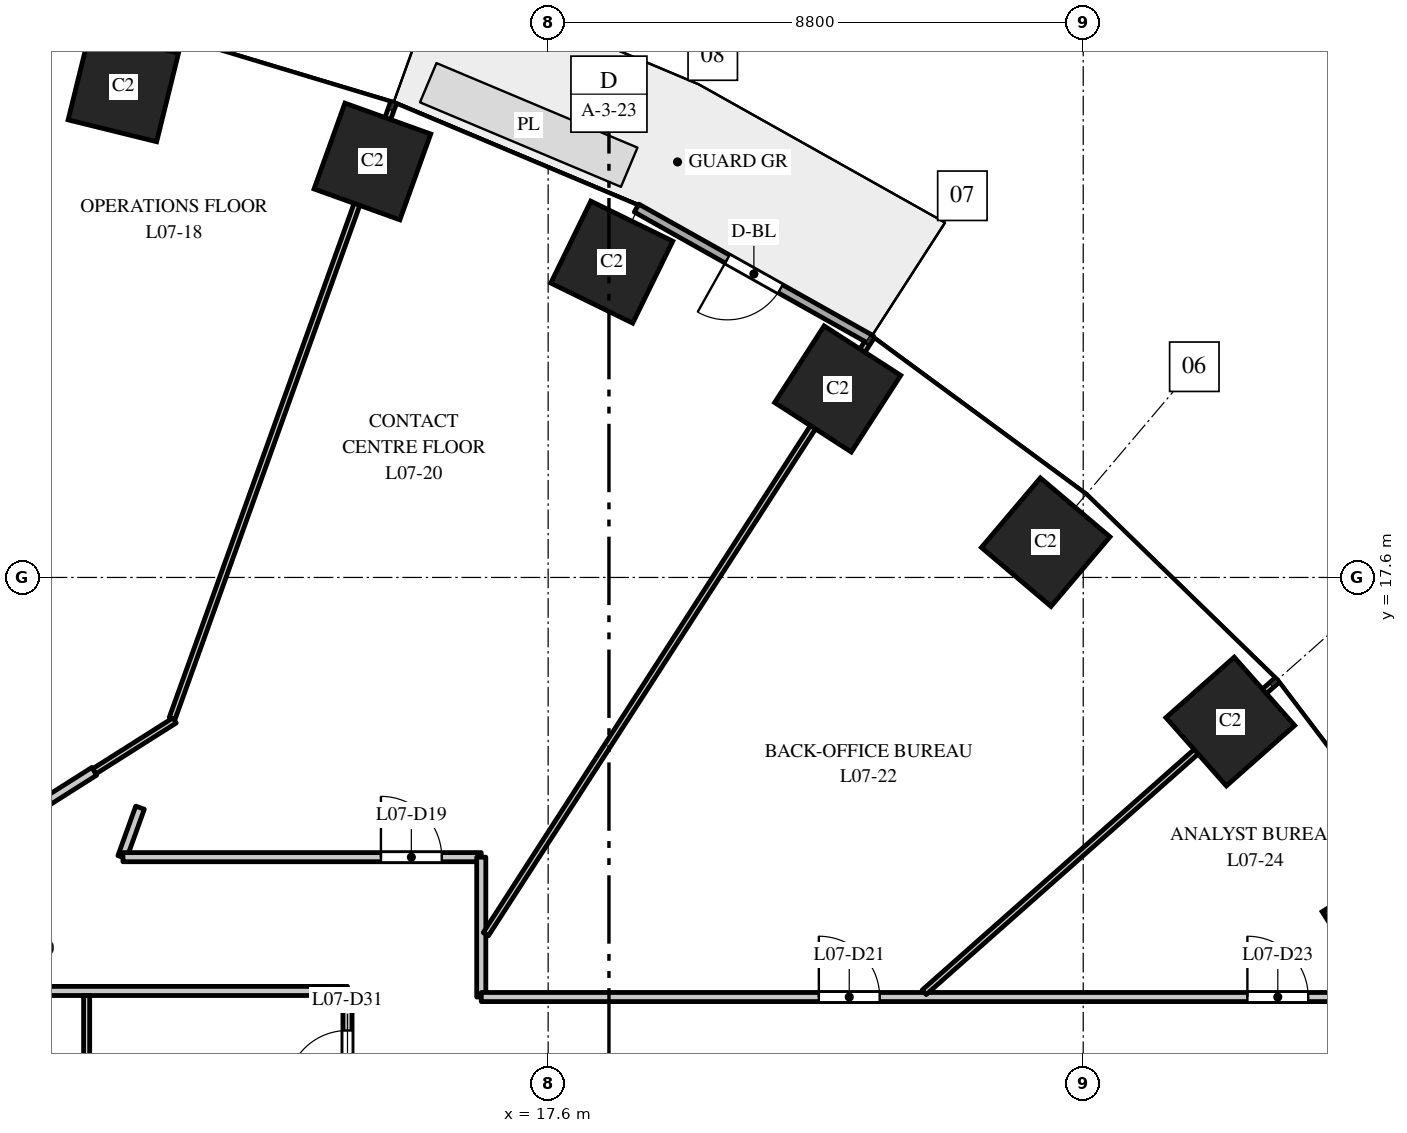
"""IFC4 building model, lengths in metres.
Left out: names, types, materials, properties, quantities, classifications, styles, units other than length and angle.
Written with IfcOpenShell. Run it as: python <this file> out.ifc"""

import sys

from ifc_helpers import new_model, si_unit, direction, frame, frame_2d, origin, origin_2d, place, context, subcontext, project, spatial, rectangle, extrude, element, fill, save


model = new_model("IFC4")
c1 = context("Model", 3, precision=1e-05, world=origin(), true_north=direction((0.0, 1.0)))
c2 = subcontext(c1, "Body", "Model", "MODEL_VIEW")
j1 = project(units=[si_unit("LENGTHUNIT", "METRE"), si_unit("PLANEANGLEUNIT", "RADIAN")], contexts=[c1])
p1 = place(None, origin())
s1 = spatial("IfcSite", under=j1, at=p1, CompositionType="ELEMENT")
p2 = place(p1, origin())
s2 = spatial("IfcBuilding", under=s1, at=p2, CompositionType="ELEMENT")
p3 = place(p2, frame((0.0, 0.0, 38.5)))
s3 = spatial("IfcBuildingStorey", under=s2, at=p3, CompositionType="ELEMENT", Elevation=38.5)
for number, where, z_axis, x_axis in (
    (1, (31.365, 11.871, 0.0), (0.0, 0.0, 1.0), (-0.535, 0.845, 0.0)),
    (2, (28.819, 15.23, 0.0), (0.0, 0.0, 1.0), (-0.663, 0.749, 0.0)),
    (3, (25.783, 18.18, 0.0), (0.0, 0.0, 1.0), (-0.763, 0.646, 0.0)),
    (4, (22.362, 20.7, 0.0), (0.0, 0.0, 1.0), (-0.84, 0.542, 0.0)),
    (5, (18.646, 22.785, 0.0), (0.0, 0.0, 1.0), (-0.898, 0.439, 0.0)),
    (6, (14.709, 24.441, 0.0), (0.0, 0.0, 1.0), (-0.941, 0.338, 0.0)),
    (7, (10.613, 25.674, 0.0), (0.0, 0.0, 1.0), (-0.971, 0.24, 0.0)),
):
    element("IfcColumn", number, at=place(p3, frame(where, z_axis=z_axis, x_axis=x_axis)), inside=s3, PredefinedType="COLUMN", context=c2, shape_type="SweptSolid", body=[
        extrude(rectangle(XDim=1.5, YDim=1.5, at=origin_2d()), origin(), (0.0, 0.0, 1.0), 4.0),
    ])
p4 = place(p3, frame((22.913, 21.509, 0.0), z_axis=(0.0, 0.0, 1.0), x_axis=(-0.872046572975, 0.489422899509, 0.0)))
e8 = element("IfcWall", 8, at=p4, inside=s3, PredefinedType="STANDARD", context=c2, shape_type="SweptSolid", body=[
    extrude(rectangle(XDim=4.426, YDim=0.15, at=frame_2d((2.213, 0.0))), origin(), (0.0, 0.0, 1.0), 3.7),
])
p5 = place(p4, frame((1.713, 0.0, 0.0)))
e9 = element("IfcOpeningElement", 9, at=p5, cuts=e8, PredefinedType="OPENING", context=c2, shape_type="SweptSolid", body=[
    extrude(rectangle(XDim=1.0, YDim=2.4, at=frame_2d((0.5, 1.2))), frame((0.0, 0.085, 0.0), z_axis=(0.0, -1.0, 0.0), x_axis=(1.0, 0.0, 0.0)), (0.0, 0.0, 1.0), 0.17),
])
p6 = place(p3, frame((-14.3, 10.8, 0.0), z_axis=(0.0, 0.0, 1.0), x_axis=(1.0, 0.0, 0.0)))
e10 = element("IfcWall", 10, at=p6, inside=s3, PredefinedType="PARTITIONING", context=c2, shape_type="SweptSolid", body=[
    extrude(rectangle(XDim=28.6, YDim=0.15, at=frame_2d((14.3, 0.0))), origin(), (0.0, 0.0, 1.0), 2.85),
])
p7 = place(p6, frame((10.66, 0.0, 0.0)))
e11 = element("IfcOpeningElement", 11, at=p7, cuts=e10, PredefinedType="OPENING", context=c2, shape_type="SweptSolid", body=[
    extrude(rectangle(XDim=1.0, YDim=2.1, at=frame_2d((0.5, 1.05))), frame((0.0, 0.085, 0.0), z_axis=(0.0, -1.0, 0.0), x_axis=(1.0, 0.0, 0.0)), (0.0, 0.0, 1.0), 0.17),
])
p8 = place(p6, frame((15.427, 0.0, 0.0)))
e12 = element("IfcOpeningElement", 12, at=p8, cuts=e10, PredefinedType="OPENING", context=c2, shape_type="SweptSolid", body=[
    extrude(rectangle(XDim=1.0, YDim=2.1, at=frame_2d((0.5, 1.05))), frame((0.0, 0.085, 0.0), z_axis=(0.0, -1.0, 0.0), x_axis=(1.0, 0.0, 0.0)), (0.0, 0.0, 1.0), 0.17),
])
p9 = place(p6, frame((22.693, 0.0, 0.0)))
e13 = element("IfcOpeningElement", 13, at=p9, cuts=e10, PredefinedType="OPENING", context=c2, shape_type="SweptSolid", body=[
    extrude(rectangle(XDim=1.0, YDim=2.1, at=frame_2d((0.5, 1.05))), frame((0.0, 0.085, 0.0), z_axis=(0.0, -1.0, 0.0), x_axis=(1.0, 0.0, 0.0)), (0.0, 0.0, 1.0), 0.17),
])
p10 = place(p3, frame((8.028, 13.077, 0.0), z_axis=(0.0, 0.0, 1.0), x_axis=(0.844718865656, 0.53521027457, 0.0)))
e14 = element("IfcWall", 14, at=p10, inside=s3, PredefinedType="PARTITIONING", context=c2, shape_type="SweptSolid", body=[
    extrude(rectangle(XDim=2.497, YDim=0.15, at=frame_2d((1.248, 0.0))), origin(), (0.0, 0.0, 1.0), 3.7),
])
p11 = place(p3, frame((10.01, -10.725, 0.0), z_axis=(0.0, 0.0, 1.0), x_axis=(0.0, 1.0, 0.0)))
e15 = element("IfcWall", 15, at=p11, inside=s3, PredefinedType="PARTITIONING", context=c2, shape_type="SweptSolid", body=[
    extrude(rectangle(XDim=21.45, YDim=0.1, at=frame_2d((10.725, 0.0))), origin(), (0.0, 0.0, 1.0), 2.75),
])
p12 = place(p3, frame((10.137, 14.413, 0.0), z_axis=(0.0, 0.0, 1.0), x_axis=(0.844849680057, 0.535003755228, 0.0)))
e16 = element("IfcWall", 16, at=p12, inside=s3, PredefinedType="PARTITIONING", context=c2, shape_type="SweptSolid", body=[
    extrude(rectangle(XDim=1.562, YDim=0.1, at=frame_2d((0.781, 0.0))), origin(), (0.0, 0.0, 1.0), 3.7),
])
p13 = place(p3, frame((10.595, 13.0, 0.0), z_axis=(0.0, 0.0, 1.0), x_axis=(0.338659506624, 0.940908995904, 0.0)))
e17 = element("IfcWall", 17, at=p13, inside=s3, PredefinedType="PARTITIONING", context=c2, shape_type="SweptSolid", body=[
    extrude(rectangle(XDim=0.865, YDim=0.15, at=frame_2d((0.433, 0.0))), origin(), (0.0, 0.0, 1.0), 3.7),
])
p14 = place(p3, frame((10.607, 13.0, 0.0), z_axis=(0.0, 0.0, 1.0), x_axis=(1.0, 0.0, 0.0)))
e18 = element("IfcWall", 18, at=p14, inside=s3, PredefinedType="PARTITIONING", context=c2, shape_type="SweptSolid", body=[
    extrude(rectangle(XDim=5.893, YDim=0.15, at=frame_2d((2.947, 0.0))), origin(), (0.0, 0.0, 1.0), 3.7),
])
p15 = place(p14, frame((4.243, 0.0, 0.0)))
e19 = element("IfcOpeningElement", 19, at=p15, cuts=e18, PredefinedType="OPENING", context=c2, shape_type="SweptSolid", body=[
    extrude(rectangle(XDim=1.0, YDim=2.1, at=frame_2d((0.5, 1.05))), frame((0.0, 0.085, 0.0), z_axis=(0.0, -1.0, 0.0), x_axis=(1.0, 0.0, 0.0)), (0.0, 0.0, 1.0), 0.17),
])
p16 = place(p3, frame((11.416, 15.282, 0.0), z_axis=(0.0, 0.0, 1.0), x_axis=(0.338364268616, 0.94101520802, 0.0)))
e20 = element("IfcWall", 20, at=p16, inside=s3, PredefinedType="PARTITIONING", context=c2, shape_type="SweptSolid", body=[
    extrude(rectangle(XDim=10.734, YDim=0.1, at=frame_2d((5.367, 0.0))), origin(), (0.0, 0.0, 1.0), 3.7),
])
p17 = place(p3, frame((14.3, -10.8, 0.0), z_axis=(0.0, 0.0, 1.0), x_axis=(0.0, 1.0, 0.0)))
e21 = element("IfcWall", 21, at=p17, inside=s3, PredefinedType="PARTITIONING", context=c2, shape_type="SweptSolid", body=[
    extrude(rectangle(XDim=21.6, YDim=0.15, at=frame_2d((10.8, 0.0))), origin(), (0.0, 0.0, 1.0), 2.75),
])
p18 = place(p17, frame((19.95, 0.0, 0.0)))
e22 = element("IfcOpeningElement", 22, at=p18, cuts=e21, PredefinedType="OPENING", context=c2, shape_type="SweptSolid", body=[
    extrude(rectangle(XDim=1.0, YDim=2.1, at=frame_2d((0.5, 1.05))), frame((0.0, 0.085, 0.0), z_axis=(0.0, -1.0, 0.0), x_axis=(1.0, 0.0, 0.0)), (0.0, 0.0, 1.0), 0.17),
])
p19 = place(p3, frame((16.5, 10.7, 0.0), z_axis=(0.0, 0.0, 1.0), x_axis=(0.0, 1.0, 0.0)))
e23 = element("IfcWall", 23, at=p19, inside=s3, PredefinedType="PARTITIONING", context=c2, shape_type="SweptSolid", body=[
    extrude(rectangle(XDim=2.3, YDim=0.15, at=frame_2d((1.15, 0.0))), origin(), (0.0, 0.0, 1.0), 3.7),
])
p20 = place(p3, frame((16.5, 10.7, 0.0), z_axis=(0.0, 0.0, 1.0), x_axis=(1.0, 0.0, 0.0)))
e24 = element("IfcWall", 24, at=p20, inside=s3, PredefinedType="PARTITIONING", context=c2, shape_type="SweptSolid", body=[
    extrude(rectangle(XDim=15.0, YDim=0.15, at=frame_2d((7.5, 0.0))), origin(), (0.0, 0.0, 1.0), 2.75),
])
p21 = place(p20, frame((5.552, 0.0, 0.0)))
e25 = element("IfcOpeningElement", 25, at=p21, cuts=e24, PredefinedType="OPENING", context=c2, shape_type="SweptSolid", body=[
    extrude(rectangle(XDim=1.0, YDim=2.1, at=frame_2d((0.5, 1.05))), frame((0.0, 0.085, 0.0), z_axis=(0.0, -1.0, 0.0), x_axis=(1.0, 0.0, 0.0)), (0.0, 0.0, 1.0), 0.17),
])
p22 = place(p20, frame((12.6, 0.0, 0.0)))
e26 = element("IfcOpeningElement", 26, at=p22, cuts=e24, PredefinedType="OPENING", context=c2, shape_type="SweptSolid", body=[
    extrude(rectangle(XDim=1.0, YDim=2.1, at=frame_2d((0.5, 1.05))), frame((0.0, 0.085, 0.0), z_axis=(0.0, -1.0, 0.0), x_axis=(1.0, 0.0, 0.0)), (0.0, 0.0, 1.0), 0.17),
])
p23 = place(p3, frame((16.575, 11.733, 0.0), z_axis=(0.0, 0.0, 1.0), x_axis=(0.54222594427, 0.840232720953, 0.0)))
e27 = element("IfcWall", 27, at=p23, inside=s3, PredefinedType="PARTITIONING", context=c2, shape_type="SweptSolid", body=[
    extrude(rectangle(XDim=11.674, YDim=0.1, at=frame_2d((5.837, 0.0))), origin(), (0.0, 0.0, 1.0), 3.7),
])
p24 = place(p3, frame((23.785, 10.778, 0.0), z_axis=(0.0, 0.0, 1.0), x_axis=(0.748985701008, 0.662586160198, 0.0)))
e28 = element("IfcWall", 28, at=p24, inside=s3, PredefinedType="PARTITIONING", context=c2, shape_type="SweptSolid", body=[
    extrude(rectangle(XDim=7.723, YDim=0.1, at=frame_2d((3.861, 0.0))), origin(), (0.0, 0.0, 1.0), 3.7),
])
p25 = place(p5, origin())
e29 = element("IfcDoor", 29, at=p25, inside=s3, OperationType="SINGLE_SWING_RIGHT", PredefinedType="DOOR", context=c2, shape_type="SweptSolid", body=[
    extrude(rectangle(XDim=1.0, YDim=2.4, at=frame_2d((0.5, 1.2))), frame((0.0, 0.025, 0.0), z_axis=(0.0, -1.0, 0.0), x_axis=(1.0, 0.0, 0.0)), (0.0, 0.0, 1.0), 0.05),
])
fill(e9, e29)
p26 = place(p15, origin())
e30 = element("IfcDoor", 30, at=p26, inside=s3, OperationType="SINGLE_SWING_LEFT", PredefinedType="DOOR", context=c2, shape_type="SweptSolid", body=[
    extrude(rectangle(XDim=1.0, YDim=2.1, at=frame_2d((0.5, 1.05))), frame((0.0, 0.025, 0.0), z_axis=(0.0, -1.0, 0.0), x_axis=(1.0, 0.0, 0.0)), (0.0, 0.0, 1.0), 0.05),
])
fill(e19, e30)
p27 = place(p21, origin())
e31 = element("IfcDoor", 31, at=p27, inside=s3, OperationType="SINGLE_SWING_LEFT", PredefinedType="DOOR", context=c2, shape_type="SweptSolid", body=[
    extrude(rectangle(XDim=1.0, YDim=2.1, at=frame_2d((0.5, 1.05))), frame((0.0, 0.025, 0.0), z_axis=(0.0, -1.0, 0.0), x_axis=(1.0, 0.0, 0.0)), (0.0, 0.0, 1.0), 0.05),
])
fill(e25, e31)
p28 = place(p22, origin())
e32 = element("IfcDoor", 32, at=p28, inside=s3, OperationType="SINGLE_SWING_LEFT", PredefinedType="DOOR", context=c2, shape_type="SweptSolid", body=[
    extrude(rectangle(XDim=1.0, YDim=2.1, at=frame_2d((0.5, 1.05))), frame((0.0, 0.025, 0.0), z_axis=(0.0, -1.0, 0.0), x_axis=(1.0, 0.0, 0.0)), (0.0, 0.0, 1.0), 0.05),
])
fill(e26, e32)
p29 = place(p18, origin())
e33 = element("IfcDoor", 33, at=p29, inside=s3, OperationType="SINGLE_SWING_LEFT", PredefinedType="DOOR", context=c2, shape_type="SweptSolid", body=[
    extrude(rectangle(XDim=1.0, YDim=2.1, at=frame_2d((0.5, 1.05))), frame((0.0, 0.025, 0.0), z_axis=(0.0, -1.0, 0.0), x_axis=(1.0, 0.0, 0.0)), (0.0, 0.0, 1.0), 0.05),
])
fill(e22, e33)
save(model, sys.argv[1])
